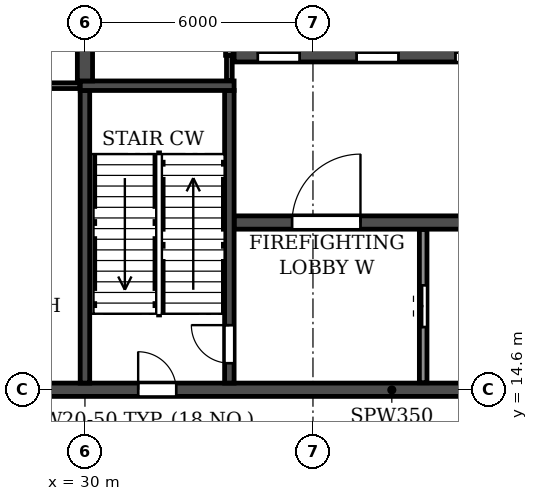
"""IFC4 building model, lengths in metres.
Left out: names, types, materials, properties, quantities, classifications, styles, units other than length and angle.
Written with IfcOpenShell. Run it as: python <this file> out.ifc"""

import sys

from ifc_helpers import new_model, si_unit, direction, frame, frame_2d, origin, place, context, subcontext, project, spatial, rectangle, extrude, element, fill, save


model = new_model("IFC4")
c1 = context("Model", 3, precision=1e-05, world=origin(), true_north=direction((0.0, 1.0)))
c2 = subcontext(c1, "Body", "Model", "MODEL_VIEW")
j1 = project(units=[si_unit("LENGTHUNIT", "METRE"), si_unit("PLANEANGLEUNIT", "RADIAN")], contexts=[c1])
p1 = place(None, origin())
s1 = spatial("IfcSite", under=j1, at=p1, CompositionType="ELEMENT")
p2 = place(p1, origin())
s2 = spatial("IfcBuilding", under=s1, at=p2, CompositionType="ELEMENT")
p3 = place(p2, frame((0.0, 0.0, 261.0)))
s3 = spatial("IfcBuildingStorey", under=s2, at=p3, CompositionType="ELEMENT", Elevation=261.0)
p4 = place(p3, frame((18.2, 14.6, 0.0), z_axis=(0.0, 0.0, 1.0), x_axis=(1.0, 0.0, 0.0)))
e1 = element("IfcWall", 1, at=p4, inside=s3, PredefinedType="SOLIDWALL", context=c2, shape_type="SweptSolid", body=[
    extrude(rectangle(XDim=65.6, YDim=0.35, at=frame_2d((32.8, 0.0))), origin(), (0.0, 0.0, 1.0), 5.7),
])
p5 = place(p4, frame((0.7, 0.0, 0.0)))
e2 = element("IfcOpeningElement", 2, at=p5, cuts=e1, PredefinedType="OPENING", context=c2, shape_type="SweptSolid", body=[
    extrude(rectangle(XDim=1.0, YDim=2.1, at=frame_2d((0.5, 1.05))), frame((0.0, 0.185, 0.0), z_axis=(0.0, -1.0, 0.0), x_axis=(1.0, 0.0, 0.0)), (0.0, 0.0, 1.0), 0.37),
])
p6 = place(p4, frame((8.7, 0.0, 0.0)))
e3 = element("IfcOpeningElement", 3, at=p6, cuts=e1, PredefinedType="OPENING", context=c2, shape_type="SweptSolid", body=[
    extrude(rectangle(XDim=0.8, YDim=2.1, at=frame_2d((0.4, 1.05))), frame((0.0, 0.185, 0.0), z_axis=(0.0, -1.0, 0.0), x_axis=(1.0, 0.0, 0.0)), (0.0, 0.0, 1.0), 0.37),
])
p7 = place(p4, frame((13.2, 0.0, 0.0)))
e4 = element("IfcOpeningElement", 4, at=p7, cuts=e1, PredefinedType="OPENING", context=c2, shape_type="SweptSolid", body=[
    extrude(rectangle(XDim=1.0, YDim=2.1, at=frame_2d((0.5, 1.05))), frame((0.0, 0.185, 0.0), z_axis=(0.0, -1.0, 0.0), x_axis=(1.0, 0.0, 0.0)), (0.0, 0.0, 1.0), 0.37),
])
p8 = place(p4, frame((25.55, 0.0, 0.0)))
e5 = element("IfcOpeningElement", 5, at=p8, cuts=e1, PredefinedType="OPENING", context=c2, shape_type="SweptSolid", body=[
    extrude(rectangle(XDim=1.5, YDim=2.1, at=frame_2d((0.75, 1.05))), frame((0.0, 0.185, 0.0), z_axis=(0.0, -1.0, 0.0), x_axis=(1.0, 0.0, 0.0)), (0.0, 0.0, 1.0), 0.37),
])
p9 = place(p4, frame((29.7, 0.0, 0.0)))
e6 = element("IfcOpeningElement", 6, at=p9, cuts=e1, PredefinedType="OPENING", context=c2, shape_type="SweptSolid", body=[
    extrude(rectangle(XDim=1.0, YDim=2.1, at=frame_2d((0.5, 1.05))), frame((0.0, 0.185, 0.0), z_axis=(0.0, -1.0, 0.0), x_axis=(1.0, 0.0, 0.0)), (0.0, 0.0, 1.0), 0.37),
])
p10 = place(p4, frame((32.3, 0.0, 0.0)))
e7 = element("IfcOpeningElement", 7, at=p10, cuts=e1, PredefinedType="OPENING", context=c2, shape_type="SweptSolid", body=[
    extrude(rectangle(XDim=1.0, YDim=2.1, at=frame_2d((0.5, 1.05))), frame((0.0, 0.185, 0.0), z_axis=(0.0, -1.0, 0.0), x_axis=(1.0, 0.0, 0.0)), (0.0, 0.0, 1.0), 0.37),
])
p11 = place(p4, frame((34.9, 0.0, 0.0)))
e8 = element("IfcOpeningElement", 8, at=p11, cuts=e1, PredefinedType="OPENING", context=c2, shape_type="SweptSolid", body=[
    extrude(rectangle(XDim=1.0, YDim=2.1, at=frame_2d((0.5, 1.05))), frame((0.0, 0.185, 0.0), z_axis=(0.0, -1.0, 0.0), x_axis=(1.0, 0.0, 0.0)), (0.0, 0.0, 1.0), 0.37),
])
p12 = place(p4, frame((38.55, 0.0, 0.0)))
e9 = element("IfcOpeningElement", 9, at=p12, cuts=e1, PredefinedType="OPENING", context=c2, shape_type="SweptSolid", body=[
    extrude(rectangle(XDim=1.5, YDim=2.1, at=frame_2d((0.75, 1.05))), frame((0.0, 0.185, 0.0), z_axis=(0.0, -1.0, 0.0), x_axis=(1.0, 0.0, 0.0)), (0.0, 0.0, 1.0), 0.37),
])
p13 = place(p4, frame((51.4, 0.0, 0.0)))
e10 = element("IfcOpeningElement", 10, at=p13, cuts=e1, PredefinedType="OPENING", context=c2, shape_type="SweptSolid", body=[
    extrude(rectangle(XDim=1.0, YDim=2.1, at=frame_2d((0.5, 1.05))), frame((0.0, 0.185, 0.0), z_axis=(0.0, -1.0, 0.0), x_axis=(1.0, 0.0, 0.0)), (0.0, 0.0, 1.0), 0.37),
])
p14 = place(p4, frame((56.1, 0.0, 0.0)))
e11 = element("IfcOpeningElement", 11, at=p14, cuts=e1, PredefinedType="OPENING", context=c2, shape_type="SweptSolid", body=[
    extrude(rectangle(XDim=0.8, YDim=2.1, at=frame_2d((0.4, 1.05))), frame((0.0, 0.185, 0.0), z_axis=(0.0, -1.0, 0.0), x_axis=(1.0, 0.0, 0.0)), (0.0, 0.0, 1.0), 0.37),
])
p15 = place(p4, frame((63.9, 0.0, 0.0)))
e12 = element("IfcOpeningElement", 12, at=p15, cuts=e1, PredefinedType="OPENING", context=c2, shape_type="SweptSolid", body=[
    extrude(rectangle(XDim=1.0, YDim=2.1, at=frame_2d((0.5, 1.05))), frame((0.0, 0.185, 0.0), z_axis=(0.0, -1.0, 0.0), x_axis=(1.0, 0.0, 0.0)), (0.0, 0.0, 1.0), 0.37),
])
p16 = place(p3, frame((33.925, 19.0, 0.0), z_axis=(0.0, 0.0, 1.0), x_axis=(1.0, 0.0, 0.0)))
e13 = element("IfcWall", 13, at=p16, inside=s3, PredefinedType="SOLIDWALL", context=c2, shape_type="SweptSolid", body=[
    extrude(rectangle(XDim=34.15, YDim=0.35, at=frame_2d((17.075, 0.0))), origin(), (0.0, 0.0, 1.0), 5.7),
])
p17 = place(p16, frame((16.175, 0.0, 0.0)))
e14 = element("IfcOpeningElement", 14, at=p17, cuts=e13, PredefinedType="OPENING", context=c2, shape_type="SweptSolid", body=[
    extrude(rectangle(XDim=1.8, YDim=2.1, at=frame_2d((0.9, 1.05))), frame((0.0, 0.185, 0.0), z_axis=(0.0, -1.0, 0.0), x_axis=(1.0, 0.0, 0.0)), (0.0, 0.0, 1.0), 0.37),
])
p18 = place(p16, frame((1.525, 0.0, 0.0)))
e15 = element("IfcOpeningElement", 15, at=p18, cuts=e13, PredefinedType="OPENING", context=c2, shape_type="SweptSolid", body=[
    extrude(rectangle(XDim=1.8, YDim=2.1, at=frame_2d((0.9, 1.05))), frame((0.0, 0.185, 0.0), z_axis=(0.0, -1.0, 0.0), x_axis=(1.0, 0.0, 0.0)), (0.0, 0.0, 1.0), 0.37),
])
p19 = place(p16, frame((30.825, 0.0, 0.0)))
e16 = element("IfcOpeningElement", 16, at=p19, cuts=e13, PredefinedType="OPENING", context=c2, shape_type="SweptSolid", body=[
    extrude(rectangle(XDim=1.8, YDim=2.1, at=frame_2d((0.9, 1.05))), frame((0.0, 0.185, 0.0), z_axis=(0.0, -1.0, 0.0), x_axis=(1.0, 0.0, 0.0)), (0.0, 0.0, 1.0), 0.37),
])
p20 = place(p3, frame((33.925, 23.4, 0.0), z_axis=(0.0, 0.0, 1.0), x_axis=(1.0, 0.0, 0.0)))
e17 = element("IfcWall", 17, at=p20, inside=s3, PredefinedType="SOLIDWALL", context=c2, shape_type="SweptSolid", body=[
    extrude(rectangle(XDim=34.15, YDim=0.35, at=frame_2d((17.075, 0.0))), origin(), (0.0, 0.0, 1.0), 5.7),
])
p21 = place(p20, frame((16.175, 0.0, 0.0)))
e18 = element("IfcOpeningElement", 18, at=p21, cuts=e17, PredefinedType="OPENING", context=c2, shape_type="SweptSolid", body=[
    extrude(rectangle(XDim=1.8, YDim=2.1, at=frame_2d((0.9, 1.05))), frame((0.0, 0.185, 0.0), z_axis=(0.0, -1.0, 0.0), x_axis=(1.0, 0.0, 0.0)), (0.0, 0.0, 1.0), 0.37),
])
p22 = place(p20, frame((0.625, 0.0, 0.0)))
e19 = element("IfcOpeningElement", 19, at=p22, cuts=e17, PredefinedType="OPENING", context=c2, shape_type="SweptSolid", body=[
    extrude(rectangle(XDim=1.1, YDim=2.1, at=frame_2d((0.55, 1.05))), frame((0.0, 0.185, 0.0), z_axis=(0.0, -1.0, 0.0), x_axis=(1.0, 0.0, 0.0)), (0.0, 0.0, 1.0), 0.37),
])
p23 = place(p20, frame((3.225, 0.0, 0.0)))
e20 = element("IfcOpeningElement", 20, at=p23, cuts=e17, PredefinedType="OPENING", context=c2, shape_type="SweptSolid", body=[
    extrude(rectangle(XDim=1.1, YDim=2.1, at=frame_2d((0.55, 1.05))), frame((0.0, 0.185, 0.0), z_axis=(0.0, -1.0, 0.0), x_axis=(1.0, 0.0, 0.0)), (0.0, 0.0, 1.0), 0.37),
])
p24 = place(p20, frame((5.825, 0.0, 0.0)))
e21 = element("IfcOpeningElement", 21, at=p24, cuts=e17, PredefinedType="OPENING", context=c2, shape_type="SweptSolid", body=[
    extrude(rectangle(XDim=1.1, YDim=2.1, at=frame_2d((0.55, 1.05))), frame((0.0, 0.185, 0.0), z_axis=(0.0, -1.0, 0.0), x_axis=(1.0, 0.0, 0.0)), (0.0, 0.0, 1.0), 0.37),
])
p25 = place(p20, frame((8.425, 0.0, 0.0)))
e22 = element("IfcOpeningElement", 22, at=p25, cuts=e17, PredefinedType="OPENING", context=c2, shape_type="SweptSolid", body=[
    extrude(rectangle(XDim=1.1, YDim=2.1, at=frame_2d((0.55, 1.05))), frame((0.0, 0.185, 0.0), z_axis=(0.0, -1.0, 0.0), x_axis=(1.0, 0.0, 0.0)), (0.0, 0.0, 1.0), 0.37),
])
p26 = place(p20, frame((11.025, 0.0, 0.0)))
e23 = element("IfcOpeningElement", 23, at=p26, cuts=e17, PredefinedType="OPENING", context=c2, shape_type="SweptSolid", body=[
    extrude(rectangle(XDim=1.1, YDim=2.1, at=frame_2d((0.55, 1.05))), frame((0.0, 0.185, 0.0), z_axis=(0.0, -1.0, 0.0), x_axis=(1.0, 0.0, 0.0)), (0.0, 0.0, 1.0), 0.37),
])
p27 = place(p20, frame((13.625, 0.0, 0.0)))
e24 = element("IfcOpeningElement", 24, at=p27, cuts=e17, PredefinedType="OPENING", context=c2, shape_type="SweptSolid", body=[
    extrude(rectangle(XDim=1.1, YDim=2.1, at=frame_2d((0.55, 1.05))), frame((0.0, 0.185, 0.0), z_axis=(0.0, -1.0, 0.0), x_axis=(1.0, 0.0, 0.0)), (0.0, 0.0, 1.0), 0.37),
])
p28 = place(p20, frame((24.625, 0.0, 0.0)))
e25 = element("IfcOpeningElement", 25, at=p28, cuts=e17, PredefinedType="OPENING", context=c2, shape_type="SweptSolid", body=[
    extrude(rectangle(XDim=1.1, YDim=2.1, at=frame_2d((0.55, 1.05))), frame((0.0, 0.185, 0.0), z_axis=(0.0, -1.0, 0.0), x_axis=(1.0, 0.0, 0.0)), (0.0, 0.0, 1.0), 0.37),
])
p29 = place(p20, frame((27.225, 0.0, 0.0)))
e26 = element("IfcOpeningElement", 26, at=p29, cuts=e17, PredefinedType="OPENING", context=c2, shape_type="SweptSolid", body=[
    extrude(rectangle(XDim=1.1, YDim=2.1, at=frame_2d((0.55, 1.05))), frame((0.0, 0.185, 0.0), z_axis=(0.0, -1.0, 0.0), x_axis=(1.0, 0.0, 0.0)), (0.0, 0.0, 1.0), 0.37),
])
p30 = place(p3, frame((30.0, 22.725, 0.0), z_axis=(0.0, 0.0, 1.0), x_axis=(0.0, 1.0, 0.0)))
e27 = element("IfcWall", 27, at=p30, inside=s3, PredefinedType="SOLIDWALL", context=c2, shape_type="SweptSolid", body=[
    extrude(rectangle(XDim=4.9, YDim=0.4, at=frame_2d((2.45, 0.0))), origin(), (0.0, 0.0, 1.0), 5.7),
])
p31 = place(p3, frame((30.0, 14.775, 0.0), z_axis=(0.0, 0.0, 1.0), x_axis=(0.0, 1.0, 0.0)))
e28 = element("IfcWall", 28, at=p31, inside=s3, PredefinedType="SOLIDWALL", context=c2, shape_type="SweptSolid", body=[
    extrude(rectangle(XDim=7.7, YDim=0.25, at=frame_2d((3.85, 0.0))), origin(), (0.0, 0.0, 1.0), 5.7),
])
p32 = place(p3, frame((33.8, 14.775, 0.0), z_axis=(0.0, 0.0, 1.0), x_axis=(0.0, 1.0, 0.0)))
e29 = element("IfcWall", 29, at=p32, inside=s3, PredefinedType="SOLIDWALL", context=c2, shape_type="SweptSolid", body=[
    extrude(rectangle(XDim=7.7, YDim=0.25, at=frame_2d((3.85, 0.0))), origin(), (0.0, 0.0, 1.0), 5.7),
])
p33 = place(p32, frame((0.525, 0.0, 0.0)))
e30 = element("IfcOpeningElement", 30, at=p33, cuts=e29, PredefinedType="OPENING", context=c2, shape_type="SweptSolid", body=[
    extrude(rectangle(XDim=1.0, YDim=2.1, at=frame_2d((0.5, 1.05))), frame((0.0, 0.135, 0.0), z_axis=(0.0, -1.0, 0.0), x_axis=(1.0, 0.0, 0.0)), (0.0, 0.0, 1.0), 0.27),
])
p34 = place(p3, frame((29.875, 22.6, 0.0), z_axis=(0.0, 0.0, 1.0), x_axis=(1.0, 0.0, 0.0)))
e31 = element("IfcWall", 31, at=p34, inside=s3, PredefinedType="SOLIDWALL", context=c2, shape_type="SweptSolid", body=[
    extrude(rectangle(XDim=4.05, YDim=0.25, at=frame_2d((2.025, 0.0))), origin(), (0.0, 0.0, 1.0), 5.7),
])
p35 = place(p3, frame((24.735, 22.6, 0.0), z_axis=(0.0, 0.0, 1.0), x_axis=(1.0, 0.0, 0.0)))
e32 = element("IfcWall", 32, at=p35, inside=s3, PredefinedType="PARTITIONING", context=c2, shape_type="SweptSolid", body=[
    extrude(rectangle(XDim=5.13, YDim=0.15, at=frame_2d((2.565, 0.0))), origin(), (0.0, 0.0, 1.0), 5.7),
])
p36 = place(p3, frame((33.8, 22.735, 0.0), z_axis=(0.0, 0.0, 1.0), x_axis=(0.0, 1.0, 0.0)))
e33 = element("IfcWall", 33, at=p36, inside=s3, PredefinedType="PARTITIONING", context=c2, shape_type="SweptSolid", body=[
    extrude(rectangle(XDim=0.665, YDim=0.15, at=frame_2d((0.333, 0.0))), origin(), (0.0, 0.0, 1.0), 5.7),
])
p37 = place(p3, frame((33.8, 23.4, 0.0), z_axis=(0.0, 0.0, 1.0), x_axis=(0.0, 1.0, 0.0)))
e34 = element("IfcWall", 34, at=p37, inside=s3, PredefinedType="PARTITIONING", context=c2, shape_type="SweptSolid", body=[
    extrude(rectangle(XDim=2.7, YDim=0.2, at=frame_2d((1.35, 0.0))), origin(), (0.0, 0.0, 1.0), 5.7),
])
p38 = place(p3, frame((38.9, 14.785, 0.0), z_axis=(0.0, 0.0, 1.0), x_axis=(0.0, 1.0, 0.0)))
e35 = element("IfcWall", 35, at=p38, inside=s3, PredefinedType="PARTITIONING", context=c2, shape_type="SweptSolid", body=[
    extrude(rectangle(XDim=4.03, YDim=0.2, at=frame_2d((2.015, 0.0))), origin(), (0.0, 0.0, 1.0), 5.7),
])
p39 = place(p38, frame((1.465, 0.0, 0.0)))
e36 = element("IfcOpeningElement", 36, at=p39, cuts=e35, PredefinedType="OPENING", context=c2, shape_type="SweptSolid", body=[
    extrude(rectangle(XDim=1.1, YDim=2.1, at=frame_2d((0.55, 1.05))), frame((0.0, 0.11, 0.0), z_axis=(0.0, -1.0, 0.0), x_axis=(1.0, 0.0, 0.0)), (0.0, 0.0, 1.0), 0.22),
])
p40 = place(p7, origin())
e37 = element("IfcDoor", 37, at=p40, inside=s3, OperationType="SINGLE_SWING_LEFT", PredefinedType="DOOR", context=c2, shape_type="SweptSolid", body=[
    extrude(rectangle(XDim=1.0, YDim=2.1, at=frame_2d((0.5, 1.05))), frame((0.0, 0.025, 0.0), z_axis=(0.0, -1.0, 0.0), x_axis=(1.0, 0.0, 0.0)), (0.0, 0.0, 1.0), 0.05),
])
fill(e4, e37)
p41 = place(p33, origin())
e38 = element("IfcDoor", 38, at=p41, inside=s3, OperationType="SINGLE_SWING_RIGHT", PredefinedType="DOOR", context=c2, shape_type="SweptSolid", body=[
    extrude(rectangle(XDim=1.0, YDim=2.1, at=frame_2d((0.5, 1.05))), frame((0.0, 0.025, 0.0), z_axis=(0.0, -1.0, 0.0), x_axis=(1.0, 0.0, 0.0)), (0.0, 0.0, 1.0), 0.05),
])
fill(e30, e38)
p42 = place(p39, origin())
e39 = element("IfcDoor", 39, at=p42, inside=s3, OperationType="DOUBLE_DOOR_SLIDING", PredefinedType="DOOR", context=c2, shape_type="SweptSolid", body=[
    extrude(rectangle(XDim=1.1, YDim=2.1, at=frame_2d((0.55, 1.05))), frame((0.0, 0.025, 0.0), z_axis=(0.0, -1.0, 0.0), x_axis=(1.0, 0.0, 0.0)), (0.0, 0.0, 1.0), 0.05),
])
fill(e36, e39)
p43 = place(p22, origin())
e40 = element("IfcDoor", 40, at=p43, inside=s3, OperationType="DOUBLE_DOOR_SLIDING", PredefinedType="DOOR", context=c2, shape_type="SweptSolid", body=[
    extrude(rectangle(XDim=1.1, YDim=2.1, at=frame_2d((0.55, 1.05))), frame((0.0, 0.025, 0.0), z_axis=(0.0, -1.0, 0.0), x_axis=(1.0, 0.0, 0.0)), (0.0, 0.0, 1.0), 0.05),
])
fill(e19, e40)
p44 = place(p18, origin())
e41 = element("IfcDoor", 41, at=p44, inside=s3, OperationType="DOUBLE_DOOR_SINGLE_SWING", PredefinedType="DOOR", context=c2, shape_type="SweptSolid", body=[
    extrude(rectangle(XDim=1.8, YDim=2.1, at=frame_2d((0.9, 1.05))), frame((0.0, 0.025, 0.0), z_axis=(0.0, -1.0, 0.0), x_axis=(1.0, 0.0, 0.0)), (0.0, 0.0, 1.0), 0.05),
])
fill(e15, e41)
p45 = place(p23, origin())
e42 = element("IfcDoor", 42, at=p45, inside=s3, OperationType="DOUBLE_DOOR_SLIDING", PredefinedType="DOOR", context=c2, shape_type="SweptSolid", body=[
    extrude(rectangle(XDim=1.1, YDim=2.1, at=frame_2d((0.55, 1.05))), frame((0.0, 0.025, 0.0), z_axis=(0.0, -1.0, 0.0), x_axis=(1.0, 0.0, 0.0)), (0.0, 0.0, 1.0), 0.05),
])
fill(e20, e42)
p46 = place(p24, origin())
e43 = element("IfcDoor", 43, at=p46, inside=s3, OperationType="DOUBLE_DOOR_SLIDING", PredefinedType="DOOR", context=c2, shape_type="SweptSolid", body=[
    extrude(rectangle(XDim=1.1, YDim=2.1, at=frame_2d((0.55, 1.05))), frame((0.0, 0.025, 0.0), z_axis=(0.0, -1.0, 0.0), x_axis=(1.0, 0.0, 0.0)), (0.0, 0.0, 1.0), 0.05),
])
fill(e21, e43)
save(model, sys.argv[1])
